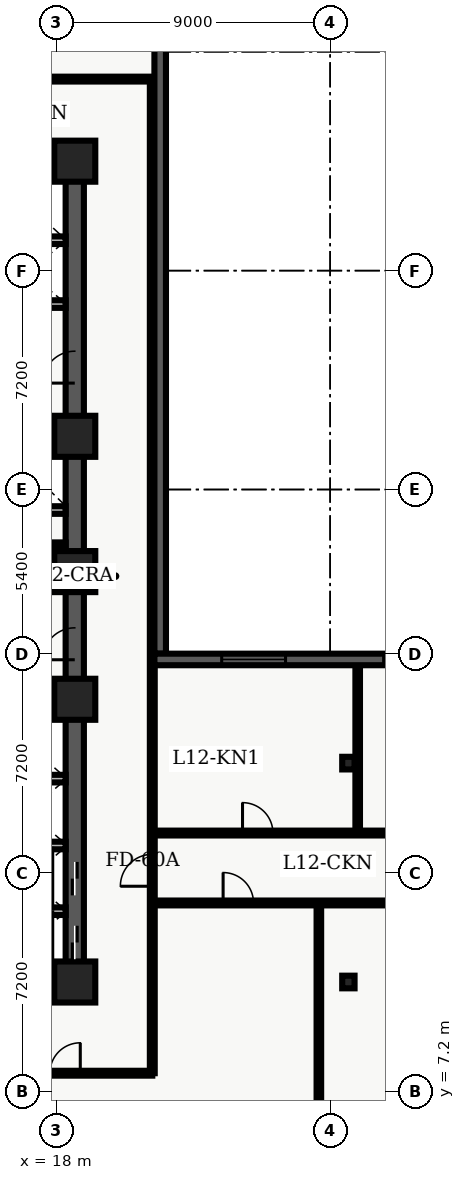
"""IFC4 building model, lengths in metres.
Left out: names, types, materials, properties, quantities, classifications, styles, units other than length and angle.
Written with IfcOpenShell. Run it as: python <this file> out.ifc"""

import sys

from ifc_helpers import new_model, entity, si_unit, converted_unit, direction, frame, origin_with_axes, origin_2d_with_axis, place, context, subcontext, project, spatial, polyline, rectangle, i_section, outline, extrude, element, fill, save


model = new_model("IFC4")
c1 = context("Model", 3, precision=1e-05, world=origin_with_axes(), true_north=direction((0.0, 1.0)))
c2 = subcontext(c1, "Body", "Model", "MODEL_VIEW")
j1 = project(units=[si_unit("LENGTHUNIT", "METRE"), converted_unit("PLANEANGLEUNIT", "DEGREE", entity("IfcPlaneAngleMeasure", 0.017), si_unit("PLANEANGLEUNIT", "RADIAN"), dimensions=[0, 0, 0, 0, 0, 0, 0])], contexts=[c1])
p1 = place(None, origin_with_axes())
s1 = spatial("IfcSite", under=j1, at=p1, CompositionType="ELEMENT")
p2 = place(p1, origin_with_axes())
s2 = spatial("IfcBuilding", under=s1, at=p2, CompositionType="ELEMENT")
p3 = place(p2, frame((0.0, 0.0, 52.2), z_axis=(0.0, 0.0, 1.0), x_axis=(1.0, 0.0, 0.0)))
s3 = spatial("IfcBuildingStorey", under=s2, at=p3, CompositionType="ELEMENT", Elevation=52.2)
p4 = place(p3, frame((11.4, 10.8, 0.0), z_axis=(0.0, 0.0, 1.0), x_axis=(1.0, 0.0, 0.0)))
e1 = element("IfcWall", 1, at=p4, inside=s3, PredefinedType="SHEAR", context=c2, shape_type="SweptSolid", body=[
    extrude(outline(polyline([(0.0, -0.3), (7.2, -0.3), (7.2, 0.3), (0.0, 0.3), (0.0, -0.3)])), origin_with_axes(), (0.0, 0.0, 1.0), 3.66),
])
p5 = place(p4, frame((2.625, 0.0, 0.0), z_axis=(0.0, 0.0, 1.0), x_axis=(1.0, 0.0, 0.0)))
e2 = element("IfcOpeningElement", 2, at=p5, cuts=e1, PredefinedType="OPENING", context=c2, shape_type="SweptSolid", body=[
    extrude(rectangle(XDim=1.05, YDim=0.62, at=origin_2d_with_axis()), origin_with_axes(), (0.0, 0.0, 1.0), 2.15),
])
p6 = place(p3, frame((11.4, 37.8, 0.0), z_axis=(0.0, 0.0, 1.0), x_axis=(1.0, 0.0, 0.0)))
e3 = element("IfcWall", 3, at=p6, inside=s3, PredefinedType="SHEAR", context=c2, shape_type="SweptSolid", body=[
    extrude(outline(polyline([(0.0, -0.3), (7.2, -0.3), (7.2, 0.3), (0.0, 0.3), (0.0, -0.3)])), origin_with_axes(), (0.0, 0.0, 1.0), 3.66),
])
p7 = place(p6, frame((2.625, 0.0, 0.0), z_axis=(0.0, 0.0, 1.0), x_axis=(1.0, 0.0, 0.0)))
e4 = element("IfcOpeningElement", 4, at=p7, cuts=e3, PredefinedType="OPENING", context=c2, shape_type="SweptSolid", body=[
    extrude(rectangle(XDim=1.05, YDim=0.62, at=origin_2d_with_axis()), origin_with_axes(), (0.0, 0.0, 1.0), 2.15),
])
p8 = place(p3, frame((18.6, 10.8, 0.0), z_axis=(0.0, 0.0, 1.0), x_axis=(0.0, 1.0, 0.0)))
e5 = element("IfcWall", 5, at=p8, inside=s3, PredefinedType="SHEAR", context=c2, shape_type="SweptSolid", body=[
    extrude(outline(polyline([(0.0, -0.3), (13.5, -0.3), (13.5, 0.3), (0.0, 0.3), (0.0, -0.3)])), origin_with_axes(), (0.0, 0.0, 1.0), 3.66),
])
p9 = place(p8, frame((1.3, 0.0, 0.0), z_axis=(0.0, 0.0, 1.0), x_axis=(1.0, 0.0, 0.0)))
e6 = element("IfcOpeningElement", 6, at=p9, cuts=e5, PredefinedType="OPENING", context=c2, shape_type="SweptSolid", body=[
    extrude(rectangle(XDim=1.1, YDim=0.62, at=origin_2d_with_axis()), origin_with_axes(), (0.0, 0.0, 1.0), 2.15),
])
p10 = place(p8, frame((3.4, 0.0, 0.0), z_axis=(0.0, 0.0, 1.0), x_axis=(1.0, 0.0, 0.0)))
e7 = element("IfcOpeningElement", 7, at=p10, cuts=e5, PredefinedType="OPENING", context=c2, shape_type="SweptSolid", body=[
    extrude(rectangle(XDim=1.1, YDim=0.62, at=origin_2d_with_axis()), origin_with_axes(), (0.0, 0.0, 1.0), 2.15),
])
p11 = place(p8, frame((11.125, 0.0, 0.0), z_axis=(0.0, 0.0, 1.0), x_axis=(1.0, 0.0, 0.0)))
e8 = element("IfcOpeningElement", 8, at=p11, cuts=e5, PredefinedType="OPENING", context=c2, shape_type="SweptSolid", body=[
    extrude(rectangle(XDim=1.05, YDim=0.62, at=origin_2d_with_axis()), origin_with_axes(), (0.0, 0.0, 1.0), 2.15),
])
p12 = place(p3, frame((18.6, 24.3, 0.0), z_axis=(0.0, 0.0, 1.0), x_axis=(0.0, 1.0, 0.0)))
e9 = element("IfcWall", 9, at=p12, inside=s3, PredefinedType="SHEAR", context=c2, shape_type="SweptSolid", body=[
    extrude(outline(polyline([(0.0, -0.3), (13.5, -0.3), (13.5, 0.3), (0.0, 0.3), (0.0, -0.3)])), origin_with_axes(), (0.0, 0.0, 1.0), 3.66),
])
p13 = place(p12, frame((6.725, 0.0, 0.0), z_axis=(0.0, 0.0, 1.0), x_axis=(1.0, 0.0, 0.0)))
e10 = element("IfcOpeningElement", 10, at=p13, cuts=e9, PredefinedType="OPENING", context=c2, shape_type="SweptSolid", body=[
    extrude(rectangle(XDim=1.05, YDim=0.62, at=origin_2d_with_axis()), origin_with_axes(), (0.0, 0.0, 1.0), 2.15),
])
for number, where, z_axis, x_axis in (
    (11, (11.7, 19.825, 0.0), (0.0, 0.0, 1.0), (1.0, 0.0, 0.0)),
    (12, (11.7, 28.775, 0.0), (0.0, 0.0, 1.0), (1.0, 0.0, 0.0)),
):
    element("IfcWall", number, at=place(p3, frame(where, z_axis=z_axis, x_axis=x_axis)), inside=s3, PredefinedType="SHEAR", context=c2, shape_type="SweptSolid", body=[
        extrude(outline(polyline([(0.0, -0.125), (6.6, -0.125), (6.6, 0.125), (0.0, 0.125), (0.0, -0.125)])), origin_with_axes(), (0.0, 0.0, 1.0), 3.66),
    ])
p14 = place(p3, frame((11.7, 24.1, 0.0), z_axis=(0.0, 0.0, 1.0), x_axis=(1.0, 0.0, 0.0)))
e13 = element("IfcWall", 13, at=p14, inside=s3, PredefinedType="SOLIDWALL", context=c2, shape_type="SweptSolid", body=[
    extrude(outline(polyline([(0.0, -0.125), (6.6, -0.125), (6.6, 0.125), (0.0, 0.125), (0.0, -0.125)])), origin_with_axes(), (0.0, 0.0, 1.0), 2.7),
])
p15 = place(p14, frame((3.75, 0.0, 0.0), z_axis=(0.0, 0.0, 1.0), x_axis=(1.0, 0.0, 0.0)))
e14 = element("IfcOpeningElement", 14, at=p15, cuts=e13, PredefinedType="OPENING", context=c2, shape_type="SweptSolid", body=[
    extrude(rectangle(XDim=0.9, YDim=0.27, at=origin_2d_with_axis()), origin_with_axes(), (0.0, 0.0, 1.0), 2.15),
])
p16 = place(p3, frame((11.7, 26.325, 0.0), z_axis=(0.0, 0.0, 1.0), x_axis=(1.0, 0.0, 0.0)))
e15 = element("IfcWall", 15, at=p16, inside=s3, PredefinedType="SOLIDWALL", context=c2, shape_type="SweptSolid", body=[
    extrude(outline(polyline([(0.0, -0.125), (6.6, -0.125), (6.6, 0.125), (0.0, 0.125), (0.0, -0.125)])), origin_with_axes(), (0.0, 0.0, 1.0), 2.7),
])
p17 = place(p16, frame((3.5, 0.0, 0.0), z_axis=(0.0, 0.0, 1.0), x_axis=(1.0, 0.0, 0.0)))
e16 = element("IfcOpeningElement", 16, at=p17, cuts=e15, PredefinedType="OPENING", context=c2, shape_type="SweptSolid", body=[
    extrude(rectangle(XDim=0.9, YDim=0.27, at=origin_2d_with_axis()), origin_with_axes(), (0.0, 0.0, 1.0), 2.15),
])
for number, where, z_axis, x_axis in (
    (17, (18.6, 10.8, 0.0), (0.0, 0.0, 1.0), (1.0, 0.0, 0.0)),
    (18, (18.6, 20.1, 0.0), (0.0, 0.0, 1.0), (1.0, 0.0, 0.0)),
    (19, (18.6, 24.3, 0.0), (0.0, 0.0, 1.0), (1.0, 0.0, 0.0)),
    (20, (18.6, 28.75, 0.0), (0.0, 0.0, 1.0), (1.0, 0.0, 0.0)),
    (21, (18.6, 37.8, 0.0), (0.0, 0.0, 1.0), (1.0, 0.0, 0.0)),
):
    element("IfcColumn", number, at=place(p3, frame(where, z_axis=z_axis, x_axis=x_axis)), inside=s3, PredefinedType="COLUMN", context=c2, shape_type="SweptSolid", body=[
        extrude(rectangle(XDim=1.35, YDim=1.35, at=origin_2d_with_axis()), origin_with_axes(), (0.0, 0.0, 1.0), 3.9),
    ])
for number, where, z_axis, x_axis in (
    (22, (27.6, 10.8, 0.0), (0.0, 0.0, 1.0), (1.0, 0.0, 0.0)),
    (23, (27.6, 18.0, 0.0), (0.0, 0.0, 1.0), (1.0, 0.0, 0.0)),
):
    element("IfcColumn", number, at=place(p3, frame(where, z_axis=z_axis, x_axis=x_axis)), inside=s3, PredefinedType="COLUMN", context=c2, shape_type="SweptSolid", body=[
        extrude(i_section(OverallWidth=0.406, OverallDepth=0.416, WebThickness=0.03, FlangeThickness=0.048, FilletRadius=0.022, at=origin_2d_with_axis()), origin_with_axes(), (0.0, 0.0, 1.0), 3.9),
    ])
p18 = place(p3, frame((14.62, 25.18, 0.0), z_axis=(0.0, 0.0, 1.0), x_axis=(1.0, 0.0, 0.0)))
e24 = element("IfcWall", 24, at=p18, inside=s3, PredefinedType="PARTITIONING", context=c2, shape_type="SweptSolid", body=[
    extrude(outline(polyline([(0.0, -0.08), (3.68, -0.08), (3.68, 0.08), (0.0, 0.08), (0.0, -0.08)])), origin_with_axes(), (0.0, 0.0, 1.0), 2.7),
])
p19 = place(p18, frame((1.95, 0.0, 0.0), z_axis=(0.0, 0.0, 1.0), x_axis=(1.0, 0.0, 0.0)))
e25 = element("IfcOpeningElement", 25, at=p19, cuts=e24, PredefinedType="OPENING", context=c2, shape_type="SweptSolid", body=[
    extrude(rectangle(XDim=0.9, YDim=0.18, at=origin_2d_with_axis()), origin_with_axes(), (0.0, 0.0, 1.0), 2.15),
])
for number, where, z_axis, x_axis in (
    (26, (15.84, 13.13, 0.0), (0.0, 0.0, 1.0), (1.0, 0.0, 0.0)),
    (27, (15.84, 15.29, 0.0), (0.0, 0.0, 1.0), (1.0, 0.0, 0.0)),
    (28, (15.84, 17.49, 0.0), (0.0, 0.0, 1.0), (1.0, 0.0, 0.0)),
    (29, (15.84, 33.1, 0.0), (0.0, 0.0, 1.0), (1.0, 0.0, 0.0)),
    (30, (15.84, 35.2, 0.0), (0.0, 0.0, 1.0), (1.0, 0.0, 0.0)),
):
    element("IfcWall", number, at=place(p3, frame(where, z_axis=z_axis, x_axis=x_axis)), inside=s3, PredefinedType="SOLIDWALL", context=c2, shape_type="SweptSolid", body=[
        extrude(outline(polyline([(0.0, -0.125), (2.46, -0.125), (2.46, 0.125), (0.0, 0.125), (0.0, -0.125)])), origin_with_axes(), (0.0, 0.0, 1.0), 2.7),
    ])
p20 = place(p3, frame((2.6, 7.8, 0.0), z_axis=(0.0, 0.0, 1.0), x_axis=(1.0, 0.0, 0.0)))
e31 = element("IfcWall", 31, at=p20, inside=s3, PredefinedType="PARTITIONING", context=c2, shape_type="SweptSolid", body=[
    extrude(outline(polyline([(0.0, -0.08), (18.55, -0.08), (18.55, 0.08), (0.0, 0.08), (0.0, -0.08)])), origin_with_axes(), (0.0, 0.0, 1.0), 2.7),
])
p21 = place(p20, frame((6.426, 0.0, 0.0), z_axis=(0.0, 0.0, 1.0), x_axis=(1.0, 0.0, 0.0)))
e32 = element("IfcOpeningElement", 32, at=p21, cuts=e31, PredefinedType="OPENING", context=c2, shape_type="SweptSolid", body=[
    extrude(rectangle(XDim=1.2, YDim=0.18, at=origin_2d_with_axis()), origin_with_axes(), (0.0, 0.0, 1.0), 2.2),
])
p22 = place(p20, frame((15.681, 0.0, 0.0), z_axis=(0.0, 0.0, 1.0), x_axis=(1.0, 0.0, 0.0)))
e33 = element("IfcOpeningElement", 33, at=p22, cuts=e31, PredefinedType="OPENING", context=c2, shape_type="SweptSolid", body=[
    extrude(rectangle(XDim=1.0, YDim=0.18, at=origin_2d_with_axis()), origin_with_axes(), (0.0, 0.0, 1.0), 2.15),
])
p23 = place(p3, frame((2.6, 40.5, 0.0), z_axis=(0.0, 0.0, 1.0), x_axis=(1.0, 0.0, 0.0)))
e34 = element("IfcWall", 34, at=p23, inside=s3, PredefinedType="PARTITIONING", context=c2, shape_type="SweptSolid", body=[
    extrude(outline(polyline([(0.0, -0.08), (18.65, -0.08), (18.65, 0.08), (0.0, 0.08), (0.0, -0.08)])), origin_with_axes(), (0.0, 0.0, 1.0), 2.7),
])
p24 = place(p23, frame((2.268, 0.0, 0.0), z_axis=(0.0, 0.0, 1.0), x_axis=(1.0, 0.0, 0.0)))
e35 = element("IfcOpeningElement", 35, at=p24, cuts=e34, PredefinedType="OPENING", context=c2, shape_type="SweptSolid", body=[
    extrude(rectangle(XDim=1.0, YDim=0.18, at=origin_2d_with_axis()), origin_with_axes(), (0.0, 0.0, 1.0), 2.15),
])
p25 = place(p23, frame((7.261, 0.0, 0.0), z_axis=(0.0, 0.0, 1.0), x_axis=(1.0, 0.0, 0.0)))
e36 = element("IfcOpeningElement", 36, at=p25, cuts=e34, PredefinedType="OPENING", context=c2, shape_type="SweptSolid", body=[
    extrude(rectangle(XDim=1.0, YDim=0.18, at=origin_2d_with_axis()), origin_with_axes(), (0.0, 0.0, 1.0), 2.15),
])
p26 = place(p23, frame((13.197, 0.0, 0.0), z_axis=(0.0, 0.0, 1.0), x_axis=(1.0, 0.0, 0.0)))
e37 = element("IfcOpeningElement", 37, at=p26, cuts=e34, PredefinedType="OPENING", context=c2, shape_type="SweptSolid", body=[
    extrude(rectangle(XDim=1.0, YDim=0.18, at=origin_2d_with_axis()), origin_with_axes(), (0.0, 0.0, 1.0), 2.15),
])
p27 = place(p3, frame((21.15, 7.8, 0.0), z_axis=(0.0, 0.0, 1.0), x_axis=(0.0, 1.0, 0.0)))
e38 = element("IfcWall", 38, at=p27, inside=s3, PredefinedType="PARTITIONING", context=c2, shape_type="SweptSolid", body=[
    extrude(outline(polyline([(0.0, -0.08), (32.7, -0.08), (32.7, 0.08), (0.0, 0.08), (0.0, -0.08)])), origin_with_axes(), (0.0, 0.0, 1.0), 2.7),
])
p28 = place(p27, frame((6.675, 0.0, 0.0), z_axis=(0.0, 0.0, 1.0), x_axis=(1.0, 0.0, 0.0)))
e39 = element("IfcOpeningElement", 39, at=p28, cuts=e38, PredefinedType="OPENING", context=c2, shape_type="SweptSolid", body=[
    extrude(rectangle(XDim=1.05, YDim=0.18, at=origin_2d_with_axis()), origin_with_axes(), (0.0, 0.0, 1.0), 2.15),
])
p29 = place(p3, frame((21.15, 13.4, 0.0), z_axis=(0.0, 0.0, 1.0), x_axis=(1.0, 0.0, 0.0)))
e40 = element("IfcWall", 40, at=p29, inside=s3, PredefinedType="PARTITIONING", context=c2, shape_type="SweptSolid", body=[
    extrude(outline(polyline([(0.0, -0.08), (15.2, -0.08), (15.2, 0.08), (0.0, 0.08), (0.0, -0.08)])), origin_with_axes(), (0.0, 0.0, 1.0), 2.7),
])
p30 = place(p29, frame((2.829, 0.0, 0.0), z_axis=(0.0, 0.0, 1.0), x_axis=(1.0, 0.0, 0.0)))
e41 = element("IfcOpeningElement", 41, at=p30, cuts=e40, PredefinedType="OPENING", context=c2, shape_type="SweptSolid", body=[
    extrude(rectangle(XDim=1.0, YDim=0.18, at=origin_2d_with_axis()), origin_with_axes(), (0.0, 0.0, 1.0), 2.15),
])
p31 = place(p29, frame((8.536, 0.0, 0.0), z_axis=(0.0, 0.0, 1.0), x_axis=(1.0, 0.0, 0.0)))
e42 = element("IfcOpeningElement", 42, at=p31, cuts=e40, PredefinedType="OPENING", context=c2, shape_type="SweptSolid", body=[
    extrude(rectangle(XDim=1.2, YDim=0.18, at=origin_2d_with_axis()), origin_with_axes(), (0.0, 0.0, 1.0), 2.2),
])
p32 = place(p29, frame((13.076, 0.0, 0.0), z_axis=(0.0, 0.0, 1.0), x_axis=(1.0, 0.0, 0.0)))
e43 = element("IfcOpeningElement", 43, at=p32, cuts=e40, PredefinedType="OPENING", context=c2, shape_type="SweptSolid", body=[
    extrude(rectangle(XDim=1.0, YDim=0.18, at=origin_2d_with_axis()), origin_with_axes(), (0.0, 0.0, 1.0), 2.15),
])
p33 = place(p3, frame((21.15, 15.7, 0.0), z_axis=(0.0, 0.0, 1.0), x_axis=(1.0, 0.0, 0.0)))
e44 = element("IfcWall", 44, at=p33, inside=s3, PredefinedType="PARTITIONING", context=c2, shape_type="SweptSolid", body=[
    extrude(outline(polyline([(0.0, -0.08), (15.2, -0.08), (15.2, 0.08), (0.0, 0.08), (0.0, -0.08)])), origin_with_axes(), (0.0, 0.0, 1.0), 2.7),
])
p34 = place(p33, frame((3.468, 0.0, 0.0), z_axis=(0.0, 0.0, 1.0), x_axis=(1.0, 0.0, 0.0)))
e45 = element("IfcOpeningElement", 45, at=p34, cuts=e44, PredefinedType="OPENING", context=c2, shape_type="SweptSolid", body=[
    extrude(rectangle(XDim=1.0, YDim=0.18, at=origin_2d_with_axis()), origin_with_axes(), (0.0, 0.0, 1.0), 2.15),
])
p35 = place(p33, frame((10.938, 0.0, 0.0), z_axis=(0.0, 0.0, 1.0), x_axis=(1.0, 0.0, 0.0)))
e46 = element("IfcOpeningElement", 46, at=p35, cuts=e44, PredefinedType="OPENING", context=c2, shape_type="SweptSolid", body=[
    extrude(rectangle(XDim=1.0, YDim=0.18, at=origin_2d_with_axis()), origin_with_axes(), (0.0, 0.0, 1.0), 2.15),
])
p36 = place(p3, frame((26.629, 0.36, 0.0), z_axis=(0.0, 0.0, 1.0), x_axis=(0.0, 1.0, 0.0)))
e47 = element("IfcWall", 47, at=p36, inside=s3, PredefinedType="PARTITIONING", context=c2, shape_type="SweptSolid", body=[
    extrude(outline(polyline([(0.0, -0.075), (12.92, -0.075), (12.92, 0.075), (0.0, 0.075), (0.0, -0.075)])), origin_with_axes(), (0.0, 0.0, 1.0), 2.7),
])
p37 = place(p3, frame((27.906, 15.82, 0.0), z_axis=(0.0, 0.0, 1.0), x_axis=(0.0, 1.0, 0.0)))
e48 = element("IfcWall", 48, at=p37, inside=s3, PredefinedType="PARTITIONING", context=c2, shape_type="SweptSolid", body=[
    extrude(outline(polyline([(0.0, -0.075), (5.405, -0.075), (5.405, 0.075), (0.0, 0.075), (0.0, -0.075)])), origin_with_axes(), (0.0, 0.0, 1.0), 2.7),
])
p38 = place(p3, frame((21.41, 45.82, 0.0), z_axis=(0.0, 0.0, 1.0), x_axis=(0.0, -1.0, 0.0)))
e49 = element("IfcWall", 49, at=p38, inside=s3, PredefinedType="SOLIDWALL", context=c2, shape_type="SweptSolid", body=[
    extrude(outline(polyline([(0.0, -0.19), (24.22, -0.19), (24.22, 0.19), (0.0, 0.19), (0.0, -0.19)])), origin_with_axes(), (0.0, 0.0, 1.0), 3.66),
])
p39 = place(p38, frame((2.902, 0.0, 0.45), z_axis=(0.0, 0.0, 1.0), x_axis=(1.0, 0.0, 0.0)))
e50 = element("IfcOpeningElement", 50, at=p39, cuts=e49, PredefinedType="OPENING", context=c2, shape_type="SweptSolid", body=[
    extrude(rectangle(XDim=2.1, YDim=0.4, at=origin_2d_with_axis()), origin_with_axes(), (0.0, 0.0, 1.0), 2.2),
])
p40 = place(p3, frame((21.22, 21.41, 0.0), z_axis=(0.0, 0.0, 1.0), x_axis=(1.0, 0.0, 0.0)))
e51 = element("IfcWall", 51, at=p40, inside=s3, PredefinedType="SOLIDWALL", context=c2, shape_type="SweptSolid", body=[
    extrude(outline(polyline([(0.0, -0.19), (17.18, -0.19), (17.18, 0.19), (0.0, 0.19), (0.0, -0.19)])), origin_with_axes(), (0.0, 0.0, 1.0), 3.66),
])
p41 = place(p40, frame((3.263, 0.0, 0.45), z_axis=(0.0, 0.0, 1.0), x_axis=(1.0, 0.0, 0.0)))
e52 = element("IfcOpeningElement", 52, at=p41, cuts=e51, PredefinedType="OPENING", context=c2, shape_type="SweptSolid", body=[
    extrude(rectangle(XDim=2.1, YDim=0.4, at=origin_2d_with_axis()), origin_with_axes(), (0.0, 0.0, 1.0), 2.2),
])
p42 = place(p40, frame((8.59, 0.0, 0.45), z_axis=(0.0, 0.0, 1.0), x_axis=(1.0, 0.0, 0.0)))
e53 = element("IfcOpeningElement", 53, at=p42, cuts=e51, PredefinedType="OPENING", context=c2, shape_type="SweptSolid", body=[
    extrude(rectangle(XDim=2.1, YDim=0.4, at=origin_2d_with_axis()), origin_with_axes(), (0.0, 0.0, 1.0), 2.2),
])
p43 = place(p40, frame((13.467, 0.0, 0.45), z_axis=(0.0, 0.0, 1.0), x_axis=(1.0, 0.0, 0.0)))
e54 = element("IfcOpeningElement", 54, at=p43, cuts=e51, PredefinedType="OPENING", context=c2, shape_type="SweptSolid", body=[
    extrude(rectangle(XDim=2.1, YDim=0.4, at=origin_2d_with_axis()), origin_with_axes(), (0.0, 0.0, 1.0), 2.2),
])
p44 = place(p8, frame((1.3, 0.0, 0.0), z_axis=(0.0, 0.0, 1.0), x_axis=(1.0, 0.0, 0.0)))
e55 = element("IfcDoor", 55, at=p44, inside=s3, OperationType="SLIDING_TO_LEFT", PredefinedType="DOOR", context=c2, shape_type="SweptSolid", body=[
    extrude(rectangle(XDim=1.1, YDim=0.09, at=origin_2d_with_axis()), origin_with_axes(), (0.0, 0.0, 1.0), 2.15),
])
fill(e6, e55)
p45 = place(p8, frame((3.4, 0.0, 0.0), z_axis=(0.0, 0.0, 1.0), x_axis=(1.0, 0.0, 0.0)))
e56 = element("IfcDoor", 56, at=p45, inside=s3, OperationType="SLIDING_TO_RIGHT", PredefinedType="DOOR", context=c2, shape_type="SweptSolid", body=[
    extrude(rectangle(XDim=1.1, YDim=0.09, at=origin_2d_with_axis()), origin_with_axes(), (0.0, 0.0, 1.0), 2.15),
])
fill(e7, e56)
p46 = place(p8, frame((11.125, 0.0, 0.0), z_axis=(0.0, 0.0, 1.0), x_axis=(1.0, 0.0, 0.0)))
e57 = element("IfcDoor", 57, at=p46, inside=s3, OperationType="SINGLE_SWING_LEFT", PredefinedType="DOOR", context=c2, shape_type="SweptSolid", body=[
    extrude(rectangle(XDim=1.05, YDim=0.09, at=origin_2d_with_axis()), origin_with_axes(), (0.0, 0.0, 1.0), 2.15),
])
fill(e8, e57)
p47 = place(p12, frame((6.725, 0.0, 0.0), z_axis=(0.0, 0.0, 1.0), x_axis=(1.0, 0.0, 0.0)))
e58 = element("IfcDoor", 58, at=p47, inside=s3, OperationType="SINGLE_SWING_LEFT", PredefinedType="DOOR", context=c2, shape_type="SweptSolid", body=[
    extrude(rectangle(XDim=1.05, YDim=0.09, at=origin_2d_with_axis()), origin_with_axes(), (0.0, 0.0, 1.0), 2.15),
])
fill(e10, e58)
p48 = place(p20, frame((15.681, 0.0, 0.0), z_axis=(0.0, 0.0, 1.0), x_axis=(1.0, 0.0, 0.0)))
e59 = element("IfcDoor", 59, at=p48, inside=s3, OperationType="SINGLE_SWING_RIGHT", PredefinedType="DOOR", context=c2, shape_type="SweptSolid", body=[
    extrude(rectangle(XDim=1.0, YDim=0.09, at=origin_2d_with_axis()), origin_with_axes(), (0.0, 0.0, 1.0), 2.15),
])
fill(e33, e59)
p49 = place(p27, frame((6.675, 0.0, 0.0), z_axis=(0.0, 0.0, 1.0), x_axis=(1.0, 0.0, 0.0)))
e60 = element("IfcDoor", 60, at=p49, inside=s3, OperationType="SINGLE_SWING_LEFT", PredefinedType="DOOR", context=c2, shape_type="SweptSolid", body=[
    extrude(rectangle(XDim=1.05, YDim=0.09, at=origin_2d_with_axis()), origin_with_axes(), (0.0, 0.0, 1.0), 2.15),
])
fill(e39, e60)
p50 = place(p29, frame((2.829, 0.0, 0.0), z_axis=(0.0, 0.0, 1.0), x_axis=(1.0, 0.0, 0.0)))
e61 = element("IfcDoor", 61, at=p50, inside=s3, OperationType="SINGLE_SWING_LEFT", PredefinedType="DOOR", context=c2, shape_type="SweptSolid", body=[
    extrude(rectangle(XDim=1.0, YDim=0.09, at=origin_2d_with_axis()), origin_with_axes(), (0.0, 0.0, 1.0), 2.15),
])
fill(e41, e61)
p51 = place(p33, frame((3.468, 0.0, 0.0), z_axis=(0.0, 0.0, 1.0), x_axis=(1.0, 0.0, 0.0)))
e62 = element("IfcDoor", 62, at=p51, inside=s3, OperationType="SINGLE_SWING_LEFT", PredefinedType="DOOR", context=c2, shape_type="SweptSolid", body=[
    extrude(rectangle(XDim=1.0, YDim=0.09, at=origin_2d_with_axis()), origin_with_axes(), (0.0, 0.0, 1.0), 2.15),
])
fill(e45, e62)
p52 = place(p40, frame((3.263, 0.0, 0.45), z_axis=(0.0, 0.0, 1.0), x_axis=(1.0, 0.0, 0.0)))
e63 = element("IfcWindow", 63, at=p52, inside=s3, PredefinedType="WINDOW", context=c2, shape_type="SweptSolid", body=[
    extrude(rectangle(XDim=2.1, YDim=0.09, at=origin_2d_with_axis()), origin_with_axes(), (0.0, 0.0, 1.0), 2.2),
])
fill(e52, e63)
p53 = place(p40, frame((8.59, 0.0, 0.45), z_axis=(0.0, 0.0, 1.0), x_axis=(1.0, 0.0, 0.0)))
e64 = element("IfcWindow", 64, at=p53, inside=s3, PredefinedType="WINDOW", context=c2, shape_type="SweptSolid", body=[
    extrude(rectangle(XDim=2.1, YDim=0.09, at=origin_2d_with_axis()), origin_with_axes(), (0.0, 0.0, 1.0), 2.2),
])
fill(e53, e64)
save(model, sys.argv[1])
